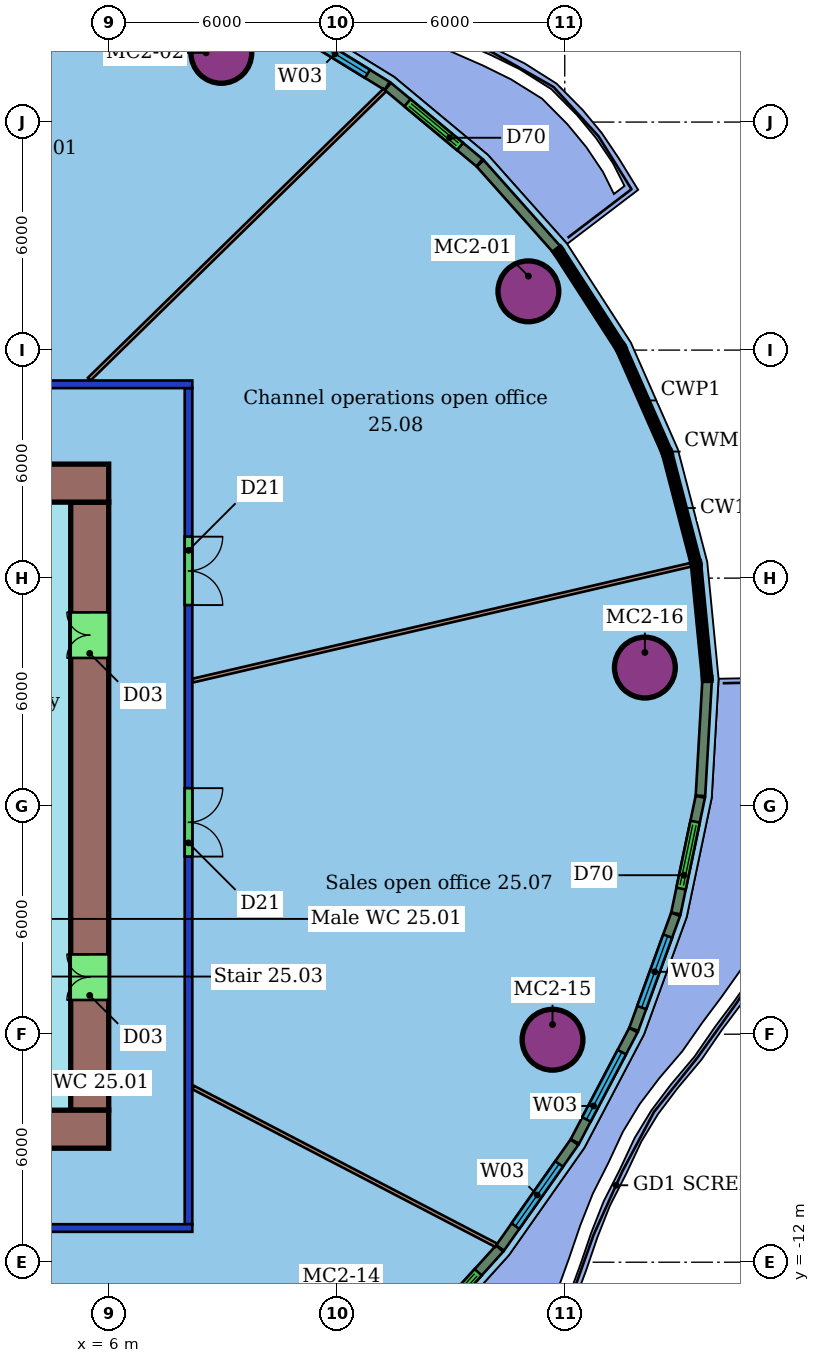
"""IFC4 building model, lengths in metres.
Left out: names, types, materials, properties, quantities, classifications, styles, units other than length and angle.
Written with IfcOpenShell. Run it as: python <this file> out.ifc"""

import sys

from ifc_helpers import new_model, si_unit, direction, frame, frame_2d, origin, origin_2d, place, context, subcontext, project, spatial, rectangle, hollow_circle, extrude, element, fill, save


model = new_model("IFC4")
c1 = context("Model", 3, precision=1e-05, world=origin(), true_north=direction((0.0, 1.0)))
c2 = subcontext(c1, "Body", "Model", "MODEL_VIEW")
j1 = project(units=[si_unit("LENGTHUNIT", "METRE"), si_unit("PLANEANGLEUNIT", "RADIAN")], contexts=[c1])
p1 = place(None, origin())
s1 = spatial("IfcSite", under=j1, at=p1, CompositionType="ELEMENT")
p2 = place(p1, origin())
s2 = spatial("IfcBuilding", under=s1, at=p2, CompositionType="ELEMENT")
p3 = place(p2, frame((0.0, 0.0, 110.2)))
s3 = spatial("IfcBuildingStorey", under=s2, at=p3, CompositionType="ELEMENT", Elevation=110.2)
for number, where, z_axis, x_axis in (
    (1, (17.043, 13.547, 0.0), (0.0, 0.0, 1.0), (1.0, 0.0, 0.0)),
    (2, (8.963, 19.821, 0.0), (0.0, 0.0, 1.0), (1.0, 0.0, 0.0)),
    (3, (17.679, -6.146, 0.0), (0.0, 0.0, 1.0), (1.0, 0.0, 0.0)),
    (4, (20.109, 3.646, 0.0), (0.0, 0.0, 1.0), (1.0, 0.0, 0.0)),
):
    element("IfcColumn", number, at=place(p3, frame(where, z_axis=z_axis, x_axis=x_axis)), inside=s3, PredefinedType="COLUMN", context=c2, shape_type="SweptSolid", body=[
        extrude(hollow_circle(Radius=0.8, WallThickness=0.055, at=origin_2d()), origin(), (0.0, 0.0, 1.0), 3.45),
    ])
p4 = place(p3, frame((8.2, -11.1, 0.0), z_axis=(0.0, 0.0, 1.0), x_axis=(-1.0, 0.0, 0.0)))
e5 = element("IfcWall", 5, at=p4, inside=s3, PredefinedType="PARTITIONING", context=c2, shape_type="SweptSolid", body=[
    extrude(rectangle(XDim=28.4, YDim=0.2, at=frame_2d((14.2, 0.0))), origin(), (0.0, 0.0, 1.0), 3.0),
])
p5 = place(p4, frame((19.148, 0.0, 0.0)))
e6 = element("IfcOpeningElement", 6, at=p5, cuts=e5, PredefinedType="OPENING", context=c2, shape_type="SweptSolid", body=[
    extrude(rectangle(XDim=1.8, YDim=2.1, at=frame_2d((0.9, 1.05))), frame((0.0, 0.11, 0.0), z_axis=(0.0, -1.0, 0.0), x_axis=(1.0, 0.0, 0.0)), (0.0, 0.0, 1.0), 0.22),
])
p6 = place(p4, frame((9.588, 0.0, 0.0)))
e7 = element("IfcOpeningElement", 7, at=p6, cuts=e5, PredefinedType="OPENING", context=c2, shape_type="SweptSolid", body=[
    extrude(rectangle(XDim=1.8, YDim=2.1, at=frame_2d((0.9, 1.05))), frame((0.0, 0.11, 0.0), z_axis=(0.0, -1.0, 0.0), x_axis=(1.0, 0.0, 0.0)), (0.0, 0.0, 1.0), 0.22),
])
p7 = place(p3, frame((-20.2, 11.1, 0.0), z_axis=(0.0, 0.0, 1.0), x_axis=(1.0, 0.0, 0.0)))
e8 = element("IfcWall", 8, at=p7, inside=s3, PredefinedType="PARTITIONING", context=c2, shape_type="SweptSolid", body=[
    extrude(rectangle(XDim=28.4, YDim=0.2, at=frame_2d((14.2, 0.0))), origin(), (0.0, 0.0, 1.0), 3.0),
])
p8 = place(p7, frame((17.12, 0.0, 0.0)))
e9 = element("IfcOpeningElement", 9, at=p8, cuts=e8, PredefinedType="OPENING", context=c2, shape_type="SweptSolid", body=[
    extrude(rectangle(XDim=1.8, YDim=2.1, at=frame_2d((0.9, 1.05))), frame((0.0, 0.11, 0.0), z_axis=(0.0, -1.0, 0.0), x_axis=(1.0, 0.0, 0.0)), (0.0, 0.0, 1.0), 0.22),
])
p9 = place(p7, frame((8.01, 0.0, 0.0)))
e10 = element("IfcOpeningElement", 10, at=p9, cuts=e8, PredefinedType="OPENING", context=c2, shape_type="SweptSolid", body=[
    extrude(rectangle(XDim=1.0, YDim=2.1, at=frame_2d((0.5, 1.05))), frame((0.0, 0.11, 0.0), z_axis=(0.0, -1.0, 0.0), x_axis=(1.0, 0.0, 0.0)), (0.0, 0.0, 1.0), 0.22),
])
p10 = place(p7, frame((3.078, 0.0, 0.0)))
e11 = element("IfcOpeningElement", 11, at=p10, cuts=e8, PredefinedType="OPENING", context=c2, shape_type="SweptSolid", body=[
    extrude(rectangle(XDim=1.0, YDim=2.4, at=frame_2d((0.5, 1.2))), frame((0.0, 0.11, 0.0), z_axis=(0.0, -1.0, 0.0), x_axis=(1.0, 0.0, 0.0)), (0.0, 0.0, 1.0), 0.22),
])
p11 = place(p3, frame((8.1, 11.0, 0.0), z_axis=(0.0, 0.0, 1.0), x_axis=(0.0, -1.0, 0.0)))
e12 = element("IfcWall", 12, at=p11, inside=s3, PredefinedType="PARTITIONING", context=c2, shape_type="SweptSolid", body=[
    extrude(rectangle(XDim=22.0, YDim=0.2, at=frame_2d((11.0, 0.0))), origin(), (0.0, 0.0, 1.0), 3.0),
])
p12 = place(p11, frame((10.526, 0.0, 0.0)))
e13 = element("IfcOpeningElement", 13, at=p12, cuts=e12, PredefinedType="OPENING", context=c2, shape_type="SweptSolid", body=[
    extrude(rectangle(XDim=1.8, YDim=2.1, at=frame_2d((0.9, 1.05))), frame((0.0, 0.11, 0.0), z_axis=(0.0, -1.0, 0.0), x_axis=(1.0, 0.0, 0.0)), (0.0, 0.0, 1.0), 0.22),
])
p13 = place(p11, frame((3.909, 0.0, 0.0)))
e14 = element("IfcOpeningElement", 14, at=p13, cuts=e12, PredefinedType="OPENING", context=c2, shape_type="SweptSolid", body=[
    extrude(rectangle(XDim=1.8, YDim=2.1, at=frame_2d((0.9, 1.05))), frame((0.0, 0.11, 0.0), z_axis=(0.0, -1.0, 0.0), x_axis=(1.0, 0.0, 0.0)), (0.0, 0.0, 1.0), 0.22),
])
p14 = place(p3, frame((13.265, 18.842, 0.0), z_axis=(0.0, 0.0, 1.0), x_axis=(-0.714906942323, -0.699219610579, 0.0)))
e15 = element("IfcWall", 15, at=p14, inside=s3, PredefinedType="PARTITIONING", context=c2, shape_type="SweptSolid", body=[
    extrude(rectangle(XDim=10.878, YDim=0.1, at=frame_2d((5.439, 0.0))), origin(), (0.0, 0.0, 1.0), 3.45),
])
p15 = place(p3, frame((16.197, -11.553, 0.0), z_axis=(0.0, 0.0, 1.0), x_axis=(-0.887035297642, 0.461701614398, 0.0)))
e16 = element("IfcWall", 16, at=p15, inside=s3, PredefinedType="PARTITIONING", context=c2, shape_type="SweptSolid", body=[
    extrude(rectangle(XDim=8.989, YDim=0.1, at=frame_2d((4.494, 0.0))), origin(), (0.0, 0.0, 1.0), 3.45),
])
p16 = place(p3, frame((21.331, 6.354, 0.0), z_axis=(0.0, 0.0, 1.0), x_axis=(-0.974027925426, -0.226427914555, 0.0)))
e17 = element("IfcWall", 17, at=p16, inside=s3, PredefinedType="PARTITIONING", context=c2, shape_type="SweptSolid", body=[
    extrude(rectangle(XDim=13.469, YDim=0.1, at=frame_2d((6.735, 0.0))), origin(), (0.0, 0.0, 1.0), 3.45),
])
p17 = place(p3, frame((17.789, 14.654, 0.0), z_axis=(0.0, 0.0, 1.0), x_axis=(-0.665250226688, 0.746620476475, 0.0)))
e18 = element("IfcWall", 18, at=p17, inside=s3, PredefinedType="SOLIDWALL", context=c2, shape_type="SweptSolid", body=[
    extrude(rectangle(XDim=3.024, YDim=0.25, at=frame_2d((1.512, 0.0))), origin(), (0.0, 0.0, 1.0), 3.05),
])
p18 = place(p3, frame((15.758, 16.93, 0.0), z_axis=(0.0, 0.0, 1.0), x_axis=(-0.768712564722, 0.639594397129, 0.0)))
e19 = element("IfcWall", 19, at=p18, inside=s3, PredefinedType="SOLIDWALL", context=c2, shape_type="SweptSolid", body=[
    extrude(rectangle(XDim=3.135, YDim=0.25, at=frame_2d((1.567, 0.0))), origin(), (0.0, 0.0, 1.0), 3.05),
])
p19 = place(p18, frame((0.667, 0.0, 0.0)))
e20 = element("IfcOpeningElement", 20, at=p19, cuts=e19, PredefinedType="OPENING", context=c2, shape_type="SweptSolid", body=[
    extrude(rectangle(XDim=1.8, YDim=2.4, at=frame_2d((0.9, 1.2))), frame((0.0, 0.135, 0.0), z_axis=(0.0, -1.0, 0.0), x_axis=(1.0, 0.0, 0.0)), (0.0, 0.0, 1.0), 0.27),
])
p20 = place(p3, frame((13.327, 18.951, 0.0), z_axis=(0.0, 0.0, 1.0), x_axis=(-0.851681761788, 0.524059325494, 0.0)))
e21 = element("IfcWall", 21, at=p20, inside=s3, PredefinedType="SOLIDWALL", context=c2, shape_type="SweptSolid", body=[
    extrude(rectangle(XDim=3.218, YDim=0.25, at=frame_2d((1.609, 0.0))), origin(), (0.0, 0.0, 1.0), 3.05),
])
p21 = place(p20, frame((0.609, 0.0, 0.9)))
e22 = element("IfcOpeningElement", 22, at=p21, cuts=e21, PredefinedType="OPENING", context=c2, shape_type="SweptSolid", body=[
    extrude(rectangle(XDim=2.0, YDim=2.1, at=frame_2d((1.0, 1.05))), frame((0.0, 0.135, 0.0), z_axis=(0.0, -1.0, 0.0), x_axis=(1.0, 0.0, 0.0)), (0.0, 0.0, 1.0), 0.27),
])
p22 = place(p3, frame((13.951, -14.224, 0.0), z_axis=(0.0, 0.0, 1.0), x_axis=(0.670380889725, 0.74201715795, 0.0)))
e23 = element("IfcWall", 23, at=p22, inside=s3, PredefinedType="SOLIDWALL", context=c2, shape_type="SweptSolid", body=[
    extrude(rectangle(XDim=3.483, YDim=0.25, at=frame_2d((1.742, 0.0))), origin(), (0.0, 0.0, 1.0), 3.05),
])
p23 = place(p22, frame((0.842, 0.0, 0.0)))
e24 = element("IfcOpeningElement", 24, at=p23, cuts=e23, PredefinedType="OPENING", context=c2, shape_type="SweptSolid", body=[
    extrude(rectangle(XDim=1.8, YDim=2.4, at=frame_2d((0.9, 1.2))), frame((0.0, 0.135, 0.0), z_axis=(0.0, -1.0, 0.0), x_axis=(1.0, 0.0, 0.0)), (0.0, 0.0, 1.0), 0.27),
])
p24 = place(p3, frame((16.301, -11.622, 0.0), z_axis=(0.0, 0.0, 1.0), x_axis=(0.57497541368, 0.818170687365, 0.0)))
e25 = element("IfcWall", 25, at=p24, inside=s3, PredefinedType="SOLIDWALL", context=c2, shape_type="SweptSolid", body=[
    extrude(rectangle(XDim=3.398, YDim=0.25, at=frame_2d((1.699, 0.0))), origin(), (0.0, 0.0, 1.0), 3.05),
])
p25 = place(p24, frame((0.699, 0.0, 0.9)))
e26 = element("IfcOpeningElement", 26, at=p25, cuts=e25, PredefinedType="OPENING", context=c2, shape_type="SweptSolid", body=[
    extrude(rectangle(XDim=2.0, YDim=2.1, at=frame_2d((1.0, 1.05))), frame((0.0, 0.135, 0.0), z_axis=(0.0, -1.0, 0.0), x_axis=(1.0, 0.0, 0.0)), (0.0, 0.0, 1.0), 0.27),
])
p26 = place(p3, frame((18.267, -8.821, 0.0), z_axis=(0.0, 0.0, 1.0), x_axis=(0.465454364303, 0.885071881121, 0.0)))
e27 = element("IfcWall", 27, at=p26, inside=s3, PredefinedType="SOLIDWALL", context=c2, shape_type="SweptSolid", body=[
    extrude(rectangle(XDim=3.308, YDim=0.25, at=frame_2d((1.654, 0.0))), origin(), (0.0, 0.0, 1.0), 3.05),
])
p27 = place(p26, frame((0.654, 0.0, 0.9)))
e28 = element("IfcOpeningElement", 28, at=p27, cuts=e27, PredefinedType="OPENING", context=c2, shape_type="SweptSolid", body=[
    extrude(rectangle(XDim=2.0, YDim=2.1, at=frame_2d((1.0, 1.05))), frame((0.0, 0.135, 0.0), z_axis=(0.0, -1.0, 0.0), x_axis=(1.0, 0.0, 0.0)), (0.0, 0.0, 1.0), 0.27),
])
p28 = place(p3, frame((19.817, -5.871, 0.0), z_axis=(0.0, 0.0, 1.0), x_axis=(0.341877080841, 0.93974467894, 0.0)))
e29 = element("IfcWall", 29, at=p28, inside=s3, PredefinedType="SOLIDWALL", context=c2, shape_type="SweptSolid", body=[
    extrude(rectangle(XDim=3.218, YDim=0.25, at=frame_2d((1.609, 0.0))), origin(), (0.0, 0.0, 1.0), 3.05),
])
p29 = place(p28, frame((0.609, 0.0, 0.9)))
e30 = element("IfcOpeningElement", 30, at=p29, cuts=e29, PredefinedType="OPENING", context=c2, shape_type="SweptSolid", body=[
    extrude(rectangle(XDim=2.0, YDim=2.1, at=frame_2d((1.0, 1.05))), frame((0.0, 0.135, 0.0), z_axis=(0.0, -1.0, 0.0), x_axis=(1.0, 0.0, 0.0)), (0.0, 0.0, 1.0), 0.27),
])
p30 = place(p3, frame((20.924, -2.822, 0.0), z_axis=(0.0, 0.0, 1.0), x_axis=(0.205198000351, 0.978720481369, 0.0)))
e31 = element("IfcWall", 31, at=p30, inside=s3, PredefinedType="SOLIDWALL", context=c2, shape_type="SweptSolid", body=[
    extrude(rectangle(XDim=3.135, YDim=0.25, at=frame_2d((1.567, 0.0))), origin(), (0.0, 0.0, 1.0), 3.05),
])
p31 = place(p30, frame((0.667, 0.0, 0.0)))
e32 = element("IfcOpeningElement", 32, at=p31, cuts=e31, PredefinedType="OPENING", context=c2, shape_type="SweptSolid", body=[
    extrude(rectangle(XDim=1.8, YDim=2.4, at=frame_2d((0.9, 1.2))), frame((0.0, 0.135, 0.0), z_axis=(0.0, -1.0, 0.0), x_axis=(1.0, 0.0, 0.0)), (0.0, 0.0, 1.0), 0.27),
])
p32 = place(p3, frame((21.571, 0.273, 0.0), z_axis=(0.0, 0.0, 1.0), x_axis=(0.057638311383, 0.998337530628, 0.0)))
e33 = element("IfcWall", 33, at=p32, inside=s3, PredefinedType="SOLIDWALL", context=c2, shape_type="SweptSolid", body=[
    extrude(rectangle(XDim=3.024, YDim=0.25, at=frame_2d((1.512, 0.0))), origin(), (0.0, 0.0, 1.0), 3.05),
])
p33 = place(p3, frame((6.0, 8.5, 0.0), z_axis=(0.0, 0.0, 1.0), x_axis=(-1.0, 0.0, 0.0)))
e34 = element("IfcWall", 34, at=p33, inside=s3, PredefinedType="SHEAR", context=c2, shape_type="SweptSolid", body=[
    extrude(rectangle(XDim=12.0, YDim=1.0, at=frame_2d((6.0, 0.0))), origin(), (0.0, 0.0, 1.0), 3.3),
])
p34 = place(p33, frame((5.6, 0.0, 0.0)))
e35 = element("IfcOpeningElement", 35, at=p34, cuts=e34, PredefinedType="OPENING", context=c2, shape_type="SweptSolid", body=[
    extrude(rectangle(XDim=1.2, YDim=2.1, at=frame_2d((0.6, 1.05))), frame((0.0, 0.51, 0.0), z_axis=(0.0, -1.0, 0.0), x_axis=(1.0, 0.0, 0.0)), (0.0, 0.0, 1.0), 1.02),
])
p35 = place(p3, frame((-18.0, -8.5, 0.0), z_axis=(0.0, 0.0, 1.0), x_axis=(1.0, 0.0, 0.0)))
e36 = element("IfcWall", 36, at=p35, inside=s3, PredefinedType="SHEAR", context=c2, shape_type="SweptSolid", body=[
    extrude(rectangle(XDim=24.0, YDim=1.0, at=frame_2d((12.0, 0.0))), origin(), (0.0, 0.0, 1.0), 3.3),
])
p36 = place(p35, frame((6.0, 0.0, 0.0)))
e37 = element("IfcOpeningElement", 37, at=p36, cuts=e36, PredefinedType="OPENING", context=c2, shape_type="SweptSolid", body=[
    extrude(rectangle(XDim=1.2, YDim=2.1, at=frame_2d((0.6, 1.05))), frame((0.0, 0.51, 0.0), z_axis=(0.0, -1.0, 0.0), x_axis=(1.0, 0.0, 0.0)), (0.0, 0.0, 1.0), 1.02),
])
p37 = place(p3, frame((5.5, -8.0, 0.0), z_axis=(0.0, 0.0, 1.0), x_axis=(0.0, 1.0, 0.0)))
e38 = element("IfcWall", 38, at=p37, inside=s3, PredefinedType="SHEAR", context=c2, shape_type="SweptSolid", body=[
    extrude(rectangle(XDim=16.0, YDim=1.0, at=frame_2d((8.0, 0.0))), origin(), (0.0, 0.0, 1.0), 3.3),
])
p38 = place(p37, frame((2.9, 0.0, 0.0)))
e39 = element("IfcOpeningElement", 39, at=p38, cuts=e38, PredefinedType="OPENING", context=c2, shape_type="SweptSolid", body=[
    extrude(rectangle(XDim=1.2, YDim=2.1, at=frame_2d((0.6, 1.05))), frame((0.0, 0.51, 0.0), z_axis=(0.0, -1.0, 0.0), x_axis=(1.0, 0.0, 0.0)), (0.0, 0.0, 1.0), 1.02),
])
p39 = place(p37, frame((11.9, 0.0, 0.0)))
e40 = element("IfcOpeningElement", 40, at=p39, cuts=e38, PredefinedType="OPENING", context=c2, shape_type="SweptSolid", body=[
    extrude(rectangle(XDim=1.2, YDim=2.1, at=frame_2d((0.6, 1.05))), frame((0.0, 0.51, 0.0), z_axis=(0.0, -1.0, 0.0), x_axis=(1.0, 0.0, 0.0)), (0.0, 0.0, 1.0), 1.02),
])
p40 = place(p12, origin())
e41 = element("IfcDoor", 41, at=p40, inside=s3, OperationType="DOUBLE_DOOR_SINGLE_SWING", PredefinedType="DOOR", context=c2, shape_type="SweptSolid", body=[
    extrude(rectangle(XDim=1.8, YDim=2.1, at=frame_2d((0.9, 1.05))), frame((0.0, 0.025, 0.0), z_axis=(0.0, -1.0, 0.0), x_axis=(1.0, 0.0, 0.0)), (0.0, 0.0, 1.0), 0.05),
])
fill(e13, e41)
p41 = place(p13, origin())
e42 = element("IfcDoor", 42, at=p41, inside=s3, OperationType="DOUBLE_DOOR_SINGLE_SWING", PredefinedType="DOOR", context=c2, shape_type="SweptSolid", body=[
    extrude(rectangle(XDim=1.8, YDim=2.1, at=frame_2d((0.9, 1.05))), frame((0.0, 0.025, 0.0), z_axis=(0.0, -1.0, 0.0), x_axis=(1.0, 0.0, 0.0)), (0.0, 0.0, 1.0), 0.05),
])
fill(e14, e42)
p42 = place(p19, origin())
e43 = element("IfcDoor", 43, at=p42, inside=s3, OperationType="DOUBLE_DOOR_SLIDING", PredefinedType="DOOR", context=c2, shape_type="SweptSolid", body=[
    extrude(rectangle(XDim=1.8, YDim=2.4, at=frame_2d((0.9, 1.2))), frame((0.0, 0.025, 0.0), z_axis=(0.0, -1.0, 0.0), x_axis=(1.0, 0.0, 0.0)), (0.0, 0.0, 1.0), 0.05),
])
fill(e20, e43)
p43 = place(p21, origin())
e44 = element("IfcWindow", 44, at=p43, inside=s3, PartitioningType="SINGLE_PANEL", PredefinedType="WINDOW", context=c2, shape_type="SweptSolid", body=[
    extrude(rectangle(XDim=2.0, YDim=2.1, at=frame_2d((1.0, 1.05))), frame((0.0, 0.03, 0.0), z_axis=(0.0, -1.0, 0.0), x_axis=(1.0, 0.0, 0.0)), (0.0, 0.0, 1.0), 0.06),
])
fill(e22, e44)
p44 = place(p23, origin())
e45 = element("IfcDoor", 45, at=p44, inside=s3, OperationType="DOUBLE_DOOR_SLIDING", PredefinedType="DOOR", context=c2, shape_type="SweptSolid", body=[
    extrude(rectangle(XDim=1.8, YDim=2.4, at=frame_2d((0.9, 1.2))), frame((0.0, 0.025, 0.0), z_axis=(0.0, -1.0, 0.0), x_axis=(1.0, 0.0, 0.0)), (0.0, 0.0, 1.0), 0.05),
])
fill(e24, e45)
p45 = place(p25, origin())
e46 = element("IfcWindow", 46, at=p45, inside=s3, PartitioningType="SINGLE_PANEL", PredefinedType="WINDOW", context=c2, shape_type="SweptSolid", body=[
    extrude(rectangle(XDim=2.0, YDim=2.1, at=frame_2d((1.0, 1.05))), frame((0.0, 0.03, 0.0), z_axis=(0.0, -1.0, 0.0), x_axis=(1.0, 0.0, 0.0)), (0.0, 0.0, 1.0), 0.06),
])
fill(e26, e46)
p46 = place(p27, origin())
e47 = element("IfcWindow", 47, at=p46, inside=s3, PartitioningType="SINGLE_PANEL", PredefinedType="WINDOW", context=c2, shape_type="SweptSolid", body=[
    extrude(rectangle(XDim=2.0, YDim=2.1, at=frame_2d((1.0, 1.05))), frame((0.0, 0.03, 0.0), z_axis=(0.0, -1.0, 0.0), x_axis=(1.0, 0.0, 0.0)), (0.0, 0.0, 1.0), 0.06),
])
fill(e28, e47)
p47 = place(p29, origin())
e48 = element("IfcWindow", 48, at=p47, inside=s3, PartitioningType="SINGLE_PANEL", PredefinedType="WINDOW", context=c2, shape_type="SweptSolid", body=[
    extrude(rectangle(XDim=2.0, YDim=2.1, at=frame_2d((1.0, 1.05))), frame((0.0, 0.03, 0.0), z_axis=(0.0, -1.0, 0.0), x_axis=(1.0, 0.0, 0.0)), (0.0, 0.0, 1.0), 0.06),
])
fill(e30, e48)
p48 = place(p31, origin())
e49 = element("IfcDoor", 49, at=p48, inside=s3, OperationType="DOUBLE_DOOR_SLIDING", PredefinedType="DOOR", context=c2, shape_type="SweptSolid", body=[
    extrude(rectangle(XDim=1.8, YDim=2.4, at=frame_2d((0.9, 1.2))), frame((0.0, 0.025, 0.0), z_axis=(0.0, -1.0, 0.0), x_axis=(1.0, 0.0, 0.0)), (0.0, 0.0, 1.0), 0.05),
])
fill(e32, e49)
p49 = place(p38, origin())
e50 = element("IfcDoor", 50, at=p49, inside=s3, OperationType="DOUBLE_DOOR_SINGLE_SWING", PredefinedType="NOTDEFINED", context=c2, shape_type="SweptSolid", body=[
    extrude(rectangle(XDim=1.2, YDim=2.1, at=frame_2d((0.6, 1.05))), frame((0.0, 0.025, 0.0), z_axis=(0.0, -1.0, 0.0), x_axis=(1.0, 0.0, 0.0)), (0.0, 0.0, 1.0), 0.05),
])
fill(e39, e50)
p50 = place(p39, origin())
e51 = element("IfcDoor", 51, at=p50, inside=s3, OperationType="DOUBLE_DOOR_SINGLE_SWING", PredefinedType="NOTDEFINED", context=c2, shape_type="SweptSolid", body=[
    extrude(rectangle(XDim=1.2, YDim=2.1, at=frame_2d((0.6, 1.05))), frame((0.0, 0.025, 0.0), z_axis=(0.0, -1.0, 0.0), x_axis=(1.0, 0.0, 0.0)), (0.0, 0.0, 1.0), 0.05),
])
fill(e40, e51)
save(model, sys.argv[1])
